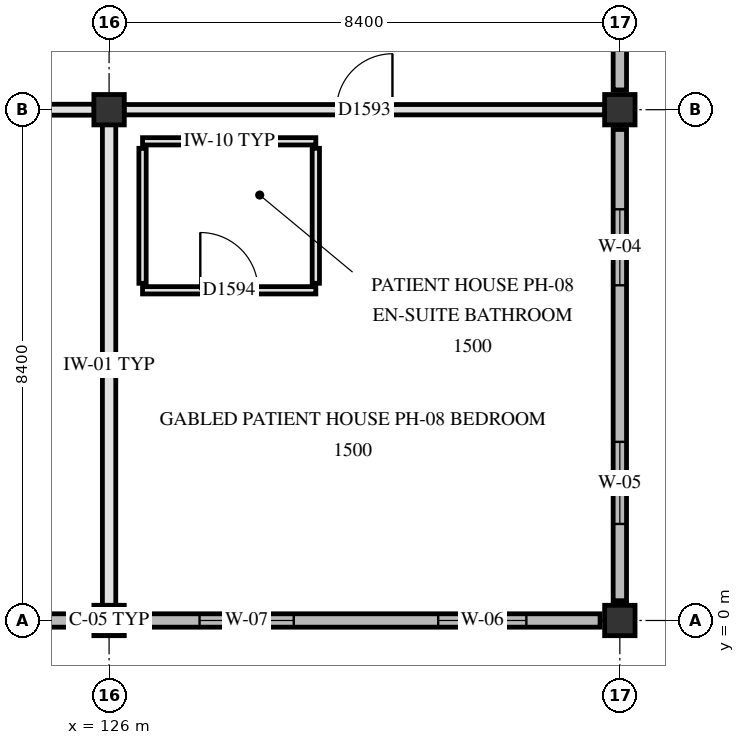
"""IFC4 building model, lengths in metres.
Left out: names, types, materials, properties, quantities, classifications, styles, units other than length and angle.
Written with IfcOpenShell. Run it as: python <this file> out.ifc"""

import sys

from ifc_helpers import new_model, si_unit, direction, frame, frame_2d, origin, origin_2d, place, context, subcontext, project, spatial, polyline, rectangle, outline, extrude, element, fill, save


model = new_model("IFC4")
c1 = context("Model", 3, precision=1e-05, world=origin(), true_north=direction((0.0, 1.0)))
c2 = subcontext(c1, "Body", "Model", "MODEL_VIEW")
j1 = project(units=[si_unit("LENGTHUNIT", "METRE"), si_unit("PLANEANGLEUNIT", "RADIAN")], contexts=[c1])
p1 = place(None, origin())
s1 = spatial("IfcSite", under=j1, at=p1, CompositionType="ELEMENT")
p2 = place(p1, origin())
s2 = spatial("IfcBuilding", under=s1, at=p2, CompositionType="ELEMENT")
p3 = place(p2, frame((0.0, 0.0, 30.3)))
s3 = spatial("IfcBuildingStorey", under=s2, at=p3, CompositionType="ELEMENT", Elevation=30.3)
for number, where, z_axis, x_axis in (
    (1, (126.0, 0.0, 0.0), (0.0, 0.0, 1.0), (1.0, 0.0, 0.0)),
    (2, (126.0, 8.4, 0.0), (0.0, 0.0, 1.0), (1.0, 0.0, 0.0)),
    (3, (134.4, 0.0, 0.0), (0.0, 0.0, 1.0), (1.0, 0.0, 0.0)),
    (4, (134.4, 8.4, 0.0), (0.0, 0.0, 1.0), (1.0, 0.0, 0.0)),
):
    element("IfcColumn", number, at=place(p3, frame(where, z_axis=z_axis, x_axis=x_axis)), inside=s3, PredefinedType="COLUMN", context=c2, shape_type="SweptSolid", body=[
        extrude(rectangle(XDim=0.5, YDim=0.5, at=origin_2d()), origin(), (0.0, 0.0, 1.0), 3.9),
    ])
p4 = place(p3, frame((134.4, 16.475, 0.0), z_axis=(0.0, 0.0, 1.0), x_axis=(0.0, -1.0, 0.0)))
e5 = element("IfcWall", 5, at=p4, inside=s3, PredefinedType="SOLIDWALL", context=c2, shape_type="SweptSolid", body=[
    extrude(rectangle(XDim=7.75, YDim=0.22, at=frame_2d((3.875, 0.0))), origin(), (0.0, 0.0, 1.0), 3.42),
])
p5 = place(p4, frame((1.413, 0.0, 0.85)))
e6 = element("IfcOpeningElement", 6, at=p5, cuts=e5, PredefinedType="OPENING", context=c2, shape_type="SweptSolid", body=[
    extrude(rectangle(XDim=1.05, YDim=1.3, at=frame_2d((0.525, 0.65))), frame((0.0, 0.12, 0.0), z_axis=(0.0, -1.0, 0.0), x_axis=(1.0, 0.0, 0.0)), (0.0, 0.0, 1.0), 0.24),
])
p6 = place(p4, frame((5.238, 0.0, 0.85)))
e7 = element("IfcOpeningElement", 7, at=p6, cuts=e5, PredefinedType="OPENING", context=c2, shape_type="SweptSolid", body=[
    extrude(rectangle(XDim=1.15, YDim=1.3, at=frame_2d((0.575, 0.65))), frame((0.0, 0.12, 0.0), z_axis=(0.0, -1.0, 0.0), x_axis=(1.0, 0.0, 0.0)), (0.0, 0.0, 1.0), 0.24),
])
p7 = place(p3, frame((134.4, 8.075, 0.0), z_axis=(0.0, 0.0, 1.0), x_axis=(0.0, -1.0, 0.0)))
e8 = element("IfcWall", 8, at=p7, inside=s3, PredefinedType="SOLIDWALL", context=c2, shape_type="SweptSolid", body=[
    extrude(rectangle(XDim=7.75, YDim=0.22, at=frame_2d((3.875, 0.0))), origin(), (0.0, 0.0, 1.0), 3.42),
])
p8 = place(p7, frame((1.312, 0.0, 0.85)))
e9 = element("IfcOpeningElement", 9, at=p8, cuts=e8, PredefinedType="OPENING", context=c2, shape_type="SweptSolid", body=[
    extrude(rectangle(XDim=1.25, YDim=1.3, at=frame_2d((0.625, 0.65))), frame((0.0, 0.12, 0.0), z_axis=(0.0, -1.0, 0.0), x_axis=(1.0, 0.0, 0.0)), (0.0, 0.0, 1.0), 0.24),
])
p9 = place(p7, frame((5.137, 0.0, 0.85)))
e10 = element("IfcOpeningElement", 10, at=p9, cuts=e8, PredefinedType="OPENING", context=c2, shape_type="SweptSolid", body=[
    extrude(rectangle(XDim=1.35, YDim=1.3, at=frame_2d((0.675, 0.65))), frame((0.0, 0.12, 0.0), z_axis=(0.0, -1.0, 0.0), x_axis=(1.0, 0.0, 0.0)), (0.0, 0.0, 1.0), 0.24),
])
p10 = place(p3, frame((134.075, 0.0, 0.0), z_axis=(0.0, 0.0, 1.0), x_axis=(-1.0, 0.0, 0.0)))
e11 = element("IfcWall", 11, at=p10, inside=s3, PredefinedType="SOLIDWALL", context=c2, shape_type="SweptSolid", body=[
    extrude(outline(polyline([(0.0, 0.0), (7.75, 0.0), (7.75, 3.4), (3.875, 5.76), (0.0, 3.4), (0.0, 0.0)])), frame((0.0, 0.11, 0.0), z_axis=(0.0, -1.0, 0.0), x_axis=(1.0, 0.0, 0.0)), (0.0, 0.0, 1.0), 0.22),
])
p11 = place(p10, frame((1.212, 0.0, 0.85)))
e12 = element("IfcOpeningElement", 12, at=p11, cuts=e11, PredefinedType="OPENING", context=c2, shape_type="SweptSolid", body=[
    extrude(rectangle(XDim=1.45, YDim=1.3, at=frame_2d((0.725, 0.65))), frame((0.0, 0.12, 0.0), z_axis=(0.0, -1.0, 0.0), x_axis=(1.0, 0.0, 0.0)), (0.0, 0.0, 1.0), 0.24),
])
p12 = place(p10, frame((5.038, 0.0, 0.85)))
e13 = element("IfcOpeningElement", 13, at=p12, cuts=e11, PredefinedType="OPENING", context=c2, shape_type="SweptSolid", body=[
    extrude(rectangle(XDim=1.55, YDim=1.3, at=frame_2d((0.775, 0.65))), frame((0.0, 0.12, 0.0), z_axis=(0.0, -1.0, 0.0), x_axis=(1.0, 0.0, 0.0)), (0.0, 0.0, 1.0), 0.24),
])
p13 = place(p3, frame((125.675, 0.0, 0.0), z_axis=(0.0, 0.0, 1.0), x_axis=(-1.0, 0.0, 0.0)))
e14 = element("IfcWall", 14, at=p13, inside=s3, PredefinedType="SOLIDWALL", context=c2, shape_type="SweptSolid", body=[
    extrude(outline(polyline([(0.0, 0.0), (7.75, 0.0), (7.75, 3.4), (3.875, 5.76), (0.0, 3.4), (0.0, 0.0)])), frame((0.0, 0.11, 0.0), z_axis=(0.0, -1.0, 0.0), x_axis=(1.0, 0.0, 0.0)), (0.0, 0.0, 1.0), 0.22),
])
p14 = place(p13, frame((1.113, 0.0, 0.85)))
e15 = element("IfcOpeningElement", 15, at=p14, cuts=e14, PredefinedType="OPENING", context=c2, shape_type="SweptSolid", body=[
    extrude(rectangle(XDim=1.65, YDim=1.3, at=frame_2d((0.825, 0.65))), frame((0.0, 0.12, 0.0), z_axis=(0.0, -1.0, 0.0), x_axis=(1.0, 0.0, 0.0)), (0.0, 0.0, 1.0), 0.24),
])
p15 = place(p13, frame((4.938, 0.0, 0.85)))
e16 = element("IfcOpeningElement", 16, at=p15, cuts=e14, PredefinedType="OPENING", context=c2, shape_type="SweptSolid", body=[
    extrude(rectangle(XDim=1.75, YDim=1.3, at=frame_2d((0.875, 0.65))), frame((0.0, 0.12, 0.0), z_axis=(0.0, -1.0, 0.0), x_axis=(1.0, 0.0, 0.0)), (0.0, 0.0, 1.0), 0.24),
])
p16 = place(p3, frame((126.55, 5.43, 0.0), z_axis=(0.0, 0.0, 1.0), x_axis=(1.0, 0.0, 0.0)))
e17 = element("IfcWall", 17, at=p16, inside=s3, PredefinedType="PARTITIONING", context=c2, shape_type="SweptSolid", body=[
    extrude(rectangle(XDim=2.85, YDim=0.12, at=frame_2d((1.425, 0.0))), origin(), (0.0, 0.0, 1.0), 3.65),
])
p17 = place(p16, frame((0.95, 0.0, 0.0)))
e18 = element("IfcOpeningElement", 18, at=p17, cuts=e17, PredefinedType="OPENING", context=c2, shape_type="SweptSolid", body=[
    extrude(rectangle(XDim=0.95, YDim=2.1, at=frame_2d((0.475, 1.05))), frame((0.0, 0.07, 0.0), z_axis=(0.0, -1.0, 0.0), x_axis=(1.0, 0.0, 0.0)), (0.0, 0.0, 1.0), 0.14),
])
p18 = place(p3, frame((126.55, 7.88, 0.0), z_axis=(0.0, 0.0, 1.0), x_axis=(1.0, 0.0, 0.0)))
e19 = element("IfcWall", 19, at=p18, inside=s3, PredefinedType="PARTITIONING", context=c2, shape_type="SweptSolid", body=[
    extrude(rectangle(XDim=2.85, YDim=0.12, at=frame_2d((1.425, 0.0))), origin(), (0.0, 0.0, 1.0), 3.65),
])
p19 = place(p3, frame((117.845, 8.4, 0.0), z_axis=(0.0, 0.0, 1.0), x_axis=(1.0, 0.0, 0.0)))
e20 = element("IfcWall", 20, at=p19, inside=s3, PredefinedType="PARTITIONING", context=c2, shape_type="SweptSolid", body=[
    extrude(rectangle(XDim=7.91, YDim=0.18, at=frame_2d((3.955, 0.0))), origin(), (0.0, 0.0, 1.0), 3.25),
])
p20 = place(p19, frame((4.335, 0.0, 0.0)))
e21 = element("IfcOpeningElement", 21, at=p20, cuts=e20, PredefinedType="OPENING", context=c2, shape_type="SweptSolid", body=[
    extrude(rectangle(XDim=1.54, YDim=2.24, at=frame_2d((0.77, 1.12))), frame((0.0, 0.1, 0.0), z_axis=(0.0, -1.0, 0.0), x_axis=(1.0, 0.0, 0.0)), (0.0, 0.0, 1.0), 0.2),
])
p21 = place(p3, frame((126.245, 8.4, 0.0), z_axis=(0.0, 0.0, 1.0), x_axis=(1.0, 0.0, 0.0)))
e22 = element("IfcWall", 22, at=p21, inside=s3, PredefinedType="PARTITIONING", context=c2, shape_type="SweptSolid", body=[
    extrude(rectangle(XDim=7.91, YDim=0.17, at=frame_2d((3.955, 0.0))), origin(), (0.0, 0.0, 1.0), 3.25),
])
p22 = place(p21, frame((3.495, 0.0, 0.0)))
e23 = element("IfcOpeningElement", 23, at=p22, cuts=e22, PredefinedType="OPENING", context=c2, shape_type="SweptSolid", body=[
    extrude(rectangle(XDim=0.92, YDim=2.08, at=frame_2d((0.46, 1.04))), frame((0.0, 0.095, 0.0), z_axis=(0.0, -1.0, 0.0), x_axis=(1.0, 0.0, 0.0)), (0.0, 0.0, 1.0), 0.19),
])
p23 = place(p3, frame((126.0, 0.245, 0.0), z_axis=(0.0, 0.0, 1.0), x_axis=(0.0, 1.0, 0.0)))
e24 = element("IfcWall", 24, at=p23, inside=s3, PredefinedType="PARTITIONING", context=c2, shape_type="SweptSolid", body=[
    extrude(rectangle(XDim=7.91, YDim=0.22, at=frame_2d((3.955, 0.0))), origin(), (0.0, 0.0, 1.0), 3.25),
])
for number, where, z_axis, x_axis in (
    (25, (126.55, 5.545, 0.0), (0.0, 0.0, 1.0), (0.0, 1.0, 0.0)),
    (26, (129.4, 5.545, 0.0), (0.0, 0.0, 1.0), (0.0, 1.0, 0.0)),
):
    element("IfcWall", number, at=place(p3, frame(where, z_axis=z_axis, x_axis=x_axis)), inside=s3, PredefinedType="PARTITIONING", context=c2, shape_type="SweptSolid", body=[
        extrude(rectangle(XDim=2.22, YDim=0.12, at=frame_2d((1.11, 0.0))), origin(), (0.0, 0.0, 1.0), 3.41),
    ])
p24 = place(p8, origin())
e27 = element("IfcWindow", 27, at=p24, inside=s3, PartitioningType="SINGLE_PANEL", PredefinedType="WINDOW", context=c2, shape_type="SweptSolid", body=[
    extrude(rectangle(XDim=1.25, YDim=1.3, at=frame_2d((0.625, 0.65))), frame((0.0, 0.03, 0.0), z_axis=(0.0, -1.0, 0.0), x_axis=(1.0, 0.0, 0.0)), (0.0, 0.0, 1.0), 0.06),
])
fill(e9, e27)
p25 = place(p9, origin())
e28 = element("IfcWindow", 28, at=p25, inside=s3, PartitioningType="SINGLE_PANEL", PredefinedType="WINDOW", context=c2, shape_type="SweptSolid", body=[
    extrude(rectangle(XDim=1.35, YDim=1.3, at=frame_2d((0.675, 0.65))), frame((0.0, 0.03, 0.0), z_axis=(0.0, -1.0, 0.0), x_axis=(1.0, 0.0, 0.0)), (0.0, 0.0, 1.0), 0.06),
])
fill(e10, e28)
p26 = place(p11, origin())
e29 = element("IfcWindow", 29, at=p26, inside=s3, PartitioningType="SINGLE_PANEL", PredefinedType="WINDOW", context=c2, shape_type="SweptSolid", body=[
    extrude(rectangle(XDim=1.45, YDim=1.3, at=frame_2d((0.725, 0.65))), frame((0.0, 0.03, 0.0), z_axis=(0.0, -1.0, 0.0), x_axis=(1.0, 0.0, 0.0)), (0.0, 0.0, 1.0), 0.06),
])
fill(e12, e29)
p27 = place(p12, origin())
e30 = element("IfcWindow", 30, at=p27, inside=s3, PartitioningType="SINGLE_PANEL", PredefinedType="WINDOW", context=c2, shape_type="SweptSolid", body=[
    extrude(rectangle(XDim=1.55, YDim=1.3, at=frame_2d((0.775, 0.65))), frame((0.0, 0.03, 0.0), z_axis=(0.0, -1.0, 0.0), x_axis=(1.0, 0.0, 0.0)), (0.0, 0.0, 1.0), 0.06),
])
fill(e13, e30)
p28 = place(p22, origin())
e31 = element("IfcDoor", 31, at=p28, inside=s3, OperationType="SINGLE_SWING_RIGHT", PredefinedType="DOOR", context=c2, shape_type="SweptSolid", body=[
    extrude(rectangle(XDim=0.92, YDim=2.08, at=frame_2d((0.46, 1.04))), frame((0.0, 0.025, 0.0), z_axis=(0.0, -1.0, 0.0), x_axis=(1.0, 0.0, 0.0)), (0.0, 0.0, 1.0), 0.05),
])
fill(e23, e31)
p29 = place(p17, origin())
e32 = element("IfcDoor", 32, at=p29, inside=s3, OperationType="SINGLE_SWING_LEFT", PredefinedType="DOOR", context=c2, shape_type="SweptSolid", body=[
    extrude(rectangle(XDim=0.95, YDim=2.1, at=frame_2d((0.475, 1.05))), frame((0.0, 0.025, 0.0), z_axis=(0.0, -1.0, 0.0), x_axis=(1.0, 0.0, 0.0)), (0.0, 0.0, 1.0), 0.05),
])
fill(e18, e32)
save(model, sys.argv[1])
